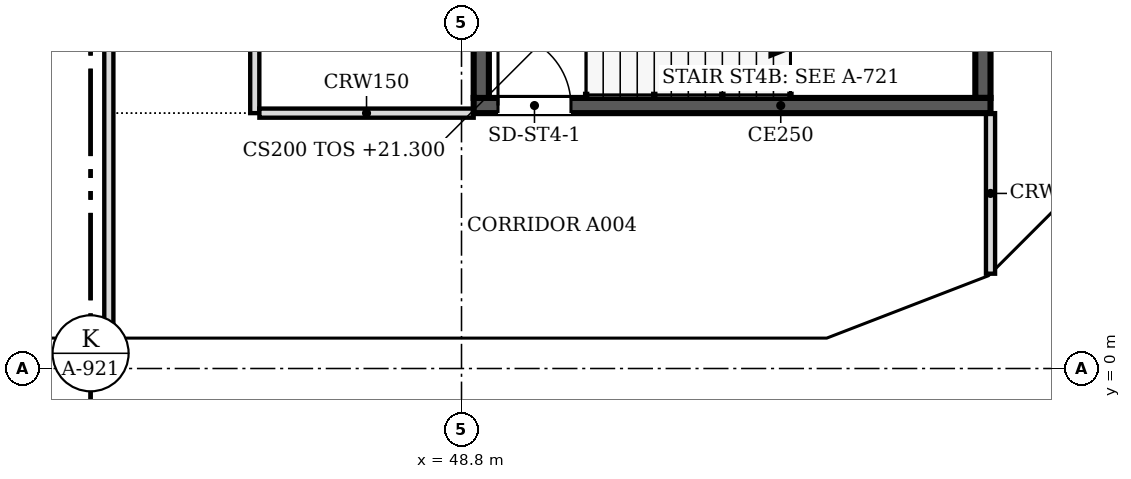
"""IFC4 building model, lengths in metres.
Left out: names, types, materials, properties, quantities, classifications, styles, units other than length and angle.
Written with IfcOpenShell. Run it as: python <this file> out.ifc"""

import sys

from ifc_helpers import new_model, si_unit, direction, frame, frame_2d, origin, place, context, subcontext, project, spatial, polyline, rectangle, outline, extrude, faceted_brep, source, transform, mapped, element, fill, save


model = new_model("IFC4")
c1 = context("Model", 3, precision=1e-05, world=origin(), true_north=direction((0.0, 1.0)))
c2 = subcontext(c1, "Body", "Model", "MODEL_VIEW")
j1 = project(units=[si_unit("LENGTHUNIT", "METRE"), si_unit("PLANEANGLEUNIT", "RADIAN")], contexts=[c1])
p1 = place(None, origin())
s1 = spatial("IfcSite", under=j1, at=p1, CompositionType="ELEMENT")
p2 = place(p1, origin())
s2 = spatial("IfcBuilding", under=s1, at=p2, CompositionType="ELEMENT")
p3 = place(p2, frame((0.0, 0.0, 21.3)))
s3 = spatial("IfcBuildingStorey", under=s2, at=p3, CompositionType="ELEMENT", Elevation=21.3)
m1 = source(origin(), c2, "Body", "Brep", [
    faceted_brep([(3.05, -0.25, 0.0), (6.1, -0.25, 4.5), (6.1, -0.25, 4.5), (3.05, -0.25, 9.0), (0.0, -0.25, 4.5), (0.0, 0.25, 4.5), (3.05, 0.25, 9.0), (6.1, 0.25, 4.5), (6.1, 0.25, 4.5), (3.05, 0.25, 0.0)], [[[0, 1, 2, 3, 4]], [[5, 6, 7, 8, 9]], [[9, 8, 1, 0]], [[7, 6, 3, 2]], [[6, 5, 4, 3]], [[5, 9, 0, 4]], [[1, 8, 7, 2]]]),
])
p4 = place(p3, frame((36.6, 0.25, -4.5), z_axis=(0.0, 0.0, 1.0), x_axis=(1.0, 0.0, 0.0)))
e1 = element("IfcWall", 1, at=p4, inside=s3, PredefinedType="SOLIDWALL", context=c2, shape_type="MappedRepresentation", body=[
    mapped(m1, transform((0.0, 0.0, 0.0), scale=1.0)),
])
m2 = source(origin(), c2, "Body", "SweptSolid", [
    extrude(outline(polyline([(3.05, 0.446), (5.798, 4.5), (3.05, 8.554), (0.302, 4.5), (3.05, 0.446)])), frame((0.0, 0.26, 0.0), z_axis=(0.0, -1.0, 0.0), x_axis=(1.0, 0.0, 0.0)), (0.0, 0.0, 1.0), 0.52),
])
p5 = place(p4, origin())
e2 = element("IfcOpeningElement", 2, at=p5, cuts=e1, PredefinedType="OPENING", context=c2, shape_type="MappedRepresentation", body=[
    mapped(m2, transform((0.0, 0.0, 0.0), scale=1.0)),
])
m3 = source(origin(), c2, "Body", "SweptSolid", [
    extrude(outline(polyline([(3.05, 0.0), (6.1, 4.5), (3.05, 9.0), (0.0, 4.5), (3.05, 0.0)])), frame((0.0, 0.25, 0.0), z_axis=(0.0, -1.0, 0.0), x_axis=(1.0, 0.0, 0.0)), (0.0, 0.0, 1.0), 0.5),
])
p6 = place(p3, frame((42.7, 0.25, -4.5), z_axis=(0.0, 0.0, 1.0), x_axis=(1.0, 0.0, 0.0)))
e3 = element("IfcWall", 3, at=p6, inside=s3, PredefinedType="SOLIDWALL", context=c2, shape_type="MappedRepresentation", body=[
    mapped(m3, transform((0.0, 0.0, 0.0), scale=1.0)),
])
p7 = place(p6, origin())
e4 = element("IfcOpeningElement", 4, at=p7, cuts=e3, PredefinedType="OPENING", context=c2, shape_type="MappedRepresentation", body=[
    mapped(m2, transform((0.0, 0.0, 0.0), scale=1.0)),
])
m4 = source(origin(), c2, "Body", "Brep", [
    faceted_brep([(3.05, -0.25, 0.0), (6.053, -0.25, 4.5), (3.05, -0.25, 9.0), (0.0, -0.25, 4.5), (0.0, 0.25, 4.5), (3.05, 0.25, 9.0), (6.007, 0.25, 4.57), (6.007, 0.25, 4.43), (3.05, 0.25, 0.0), (6.053, 0.0, 4.5)], [[[0, 1, 2, 3]], [[4, 5, 6, 7, 8]], [[8, 7, 9, 1, 0]], [[6, 5, 2, 1, 9]], [[5, 4, 3, 2]], [[4, 8, 0, 3]], [[9, 7, 6]]]),
])
p8 = place(p3, frame((48.8, 0.25, -4.5), z_axis=(0.0, 0.0, 1.0), x_axis=(1.0, 0.0, 0.0)))
e5 = element("IfcWall", 5, at=p8, inside=s3, PredefinedType="SOLIDWALL", context=c2, shape_type="MappedRepresentation", body=[
    mapped(m4, transform((0.0, 0.0, 0.0), scale=1.0)),
])
m5 = source(origin(), c2, "Body", "SweptSolid", [
    extrude(outline(polyline([(3.048, 0.448), (5.753, 4.5), (3.048, 8.552), (0.302, 4.5), (3.048, 0.448)])), frame((0.0, 0.26, 0.0), z_axis=(0.0, -1.0, 0.0), x_axis=(1.0, 0.0, 0.0)), (0.0, 0.0, 1.0), 0.52),
])
p9 = place(p8, origin())
e6 = element("IfcOpeningElement", 6, at=p9, cuts=e5, PredefinedType="OPENING", context=c2, shape_type="MappedRepresentation", body=[
    mapped(m5, transform((0.0, 0.0, 0.0), scale=1.0)),
])
m6 = source(origin(), c2, "Body", "Brep", [
    faceted_brep([(2.95, -0.25, 0.0), (3.003, -0.25, 0.081), (3.003, -0.25, 8.919), (2.95, -0.25, 9.0), (0.0, -0.25, 4.5), (0.047, 0.25, 4.571), (2.898, 0.25, 8.919), (2.898, 0.25, 0.081), (0.047, 0.25, 4.429), (2.95, 0.0, 0.0), (2.95, 0.0, 9.0), (0.0, 0.0, 4.5)], [[[0, 1, 2, 3, 4]], [[5, 6, 7, 8]], [[1, 0, 9]], [[10, 3, 2]], [[6, 5, 11, 4, 3, 10]], [[8, 7, 9, 0, 4, 11]], [[8, 11, 5]], [[1, 9, 7, 6, 10, 2]]]),
])
p10 = place(p3, frame((54.854, 0.25, -4.5), z_axis=(0.0, 0.0, 1.0), x_axis=(0.932970071518, 0.359953949349, 0.0)))
e7 = element("IfcWall", 7, at=p10, inside=s3, PredefinedType="SOLIDWALL", context=c2, shape_type="MappedRepresentation", body=[
    mapped(m6, transform((0.0, 0.0, 0.0), scale=1.0)),
])
m7 = source(origin(), c2, "Body", "SweptSolid", [
    extrude(outline(polyline([(2.75, 8.239), (0.299, 4.5), (2.75, 0.761), (2.75, 8.239)])), frame((0.0, 0.26, 0.0), z_axis=(0.0, -1.0, 0.0), x_axis=(1.0, 0.0, 0.0)), (0.0, 0.0, 1.0), 0.52),
])
p11 = place(p10, origin())
e8 = element("IfcOpeningElement", 8, at=p11, cuts=e7, PredefinedType="OPENING", context=c2, shape_type="MappedRepresentation", body=[
    mapped(m7, transform((0.0, 0.0, 0.0), scale=1.0)),
])
m8 = source(origin(), c2, "Body", "Brep", [
    faceted_brep([(0.053, -0.25, 0.0), (2.997, -0.25, 4.5), (0.053, -0.25, 9.0), (0.0, -0.25, 8.919), (0.0, -0.25, 0.081), (0.106, 0.25, 8.919), (2.944, 0.25, 4.581), (2.944, 0.25, 4.419), (0.106, 0.25, 0.081), (2.997, 0.0, 4.5), (0.053, 0.0, 0.0), (0.053, 0.0, 9.0)], [[[0, 1, 2, 3, 4]], [[5, 6, 7, 8]], [[8, 7, 9, 1, 0, 10]], [[6, 5, 11, 2, 1, 9]], [[3, 2, 11]], [[10, 0, 4]], [[8, 10, 4, 3, 11, 5]], [[9, 7, 6]]]),
])
p12 = place(p3, frame((57.569, 1.274, -4.5), z_axis=(0.0, 0.0, 1.0), x_axis=(0.707066050402, 0.707147509625, 0.0)))
e9 = element("IfcWall", 9, at=p12, inside=s3, PredefinedType="SOLIDWALL", context=c2, shape_type="MappedRepresentation", body=[
    mapped(m8, transform((0.0, 0.0, 0.0), scale=1.0)),
])
m9 = source(origin(), c2, "Body", "SweptSolid", [
    extrude(outline(polyline([(0.253, 0.762), (2.698, 4.5), (0.253, 8.238), (0.253, 0.762)])), frame((0.0, 0.26, 0.0), z_axis=(0.0, -1.0, 0.0), x_axis=(1.0, 0.0, 0.0)), (0.0, 0.0, 1.0), 0.52),
])
p13 = place(p12, origin())
e10 = element("IfcOpeningElement", 10, at=p13, cuts=e9, PredefinedType="OPENING", context=c2, shape_type="MappedRepresentation", body=[
    mapped(m9, transform((0.0, 0.0, 0.0), scale=1.0)),
])
m10 = source(origin(), c2, "Body", "SweptSolid", [
    extrude(outline(polyline([(3.05, 0.0), (6.1, 4.5), (0.0, 4.5), (3.05, 0.0)])), frame((0.0, 0.25, 0.0), z_axis=(0.0, -1.0, 0.0), x_axis=(1.0, 0.0, 0.0)), (0.0, 0.0, 1.0), 0.5),
])
p14 = place(p3, frame((39.65, 0.25, 0.0), z_axis=(0.0, 0.0, 1.0), x_axis=(1.0, 0.0, 0.0)))
e11 = element("IfcWall", 11, at=p14, inside=s3, PredefinedType="SOLIDWALL", context=c2, shape_type="MappedRepresentation", body=[
    mapped(m10, transform((0.0, 0.0, 0.0), scale=1.0)),
])
m11 = source(origin(), c2, "Body", "SweptSolid", [
    extrude(outline(polyline([(3.05, 0.446), (5.629, 4.25), (0.471, 4.25), (3.05, 0.446)])), frame((0.0, 0.26, 0.0), z_axis=(0.0, -1.0, 0.0), x_axis=(1.0, 0.0, 0.0)), (0.0, 0.0, 1.0), 0.52),
])
p15 = place(p14, origin())
e12 = element("IfcOpeningElement", 12, at=p15, cuts=e11, PredefinedType="OPENING", context=c2, shape_type="MappedRepresentation", body=[
    mapped(m11, transform((0.0, 0.0, 0.0), scale=1.0)),
])
p16 = place(p3, frame((45.75, 0.25, 0.0), z_axis=(0.0, 0.0, 1.0), x_axis=(1.0, 0.0, 0.0)))
e13 = element("IfcWall", 13, at=p16, inside=s3, PredefinedType="SOLIDWALL", context=c2, shape_type="MappedRepresentation", body=[
    mapped(m10, transform((0.0, 0.0, 0.0), scale=1.0)),
])
p17 = place(p16, origin())
e14 = element("IfcOpeningElement", 14, at=p17, cuts=e13, PredefinedType="OPENING", context=c2, shape_type="MappedRepresentation", body=[
    mapped(m11, transform((0.0, 0.0, 0.0), scale=1.0)),
])
m12 = source(origin(), c2, "Body", "Brep", [
    faceted_brep([(3.003, -0.25, 0.0), (3.05, -0.25, 0.071), (3.05, -0.25, 4.5), (0.0, -0.25, 4.5), (0.0, 0.25, 4.5), (2.957, 0.25, 4.5), (2.957, 0.25, 0.07), (3.003, 0.0, 0.0)], [[[0, 1, 2, 3]], [[4, 5, 6]], [[1, 0, 7]], [[5, 4, 3, 2]], [[4, 6, 7, 0, 3]], [[1, 7, 6, 5, 2]]]),
])
p18 = place(p3, frame((51.85, 0.25, 0.0), z_axis=(0.0, 0.0, 1.0), x_axis=(1.0, 0.0, 0.0)))
e15 = element("IfcWall", 15, at=p18, inside=s3, PredefinedType="SOLIDWALL", context=c2, shape_type="MappedRepresentation", body=[
    mapped(m12, transform((0.0, 0.0, 0.0), scale=1.0)),
])
m13 = source(origin(), c2, "Body", "SweptSolid", [
    extrude(outline(polyline([(2.803, 4.25), (0.468, 4.25), (2.803, 0.75), (2.803, 4.25)])), frame((0.0, 0.26, 0.0), z_axis=(0.0, -1.0, 0.0), x_axis=(1.0, 0.0, 0.0)), (0.0, 0.0, 1.0), 0.52),
])
p19 = place(p18, origin())
e16 = element("IfcOpeningElement", 16, at=p19, cuts=e15, PredefinedType="OPENING", context=c2, shape_type="MappedRepresentation", body=[
    mapped(m13, transform((0.0, 0.0, 0.0), scale=1.0)),
])
m14 = source(origin(), c2, "Body", "Brep", [
    faceted_brep([(0.047, -0.25, 0.0), (2.997, -0.25, 4.5), (0.0, -0.25, 4.5), (0.0, -0.25, 0.07), (0.093, 0.25, 4.5), (2.944, 0.25, 4.5), (2.944, 0.25, 4.419), (0.093, 0.25, 0.071), (2.997, 0.0, 4.5), (0.047, 0.0, 0.0)], [[[0, 1, 2, 3]], [[4, 5, 6, 7]], [[7, 6, 8, 1, 0, 9]], [[5, 4, 2, 1, 8]], [[9, 0, 3]], [[7, 9, 3, 2, 4]], [[6, 5, 8]]]),
])
p20 = place(p3, frame((54.81, 0.233, 0.0), z_axis=(0.0, 0.0, 1.0), x_axis=(0.932990326376, 0.359901446078, 0.0)))
e17 = element("IfcWall", 17, at=p20, inside=s3, PredefinedType="SOLIDWALL", context=c2, shape_type="MappedRepresentation", body=[
    mapped(m14, transform((0.0, 0.0, 0.0), scale=1.0)),
])
m15 = source(origin(), c2, "Body", "SweptSolid", [
    extrude(outline(polyline([(0.247, 0.761), (2.534, 4.25), (0.247, 4.25), (0.247, 0.761)])), frame((0.0, 0.26, 0.0), z_axis=(0.0, -1.0, 0.0), x_axis=(1.0, 0.0, 0.0)), (0.0, 0.0, 1.0), 0.52),
])
p21 = place(p20, origin())
e18 = element("IfcOpeningElement", 18, at=p21, cuts=e17, PredefinedType="OPENING", context=c2, shape_type="MappedRepresentation", body=[
    mapped(m15, transform((0.0, 0.0, 0.0), scale=1.0)),
])
m16 = source(origin(), c2, "Body", "Brep", [
    faceted_brep([(2.944, -0.25, 0.0), (2.997, -0.25, 0.081), (2.997, -0.25, 4.5), (0.0, -0.25, 4.5), (0.053, 0.25, 4.5), (2.891, 0.25, 4.5), (2.891, 0.25, 0.081), (0.053, 0.25, 4.419), (2.944, 0.0, 0.0), (0.0, 0.0, 4.5)], [[[0, 1, 2, 3]], [[4, 5, 6, 7]], [[1, 0, 8]], [[5, 4, 9, 3, 2]], [[7, 6, 8, 0, 3, 9]], [[7, 9, 4]], [[1, 8, 6, 5, 2]]]),
])
p22 = place(p3, frame((57.606, 1.312, 0.0), z_axis=(0.0, 0.0, 1.0), x_axis=(0.707147509625, 0.707066050402, 0.0)))
e19 = element("IfcWall", 19, at=p22, inside=s3, PredefinedType="SOLIDWALL", context=c2, shape_type="MappedRepresentation", body=[
    mapped(m16, transform((0.0, 0.0, 0.0), scale=1.0)),
])
m17 = source(origin(), c2, "Body", "SweptSolid", [
    extrude(outline(polyline([(2.744, 4.25), (0.462, 4.25), (2.744, 0.762), (2.744, 4.25)])), frame((0.0, 0.26, 0.0), z_axis=(0.0, -1.0, 0.0), x_axis=(1.0, 0.0, 0.0)), (0.0, 0.0, 1.0), 0.52),
])
p23 = place(p22, origin())
e20 = element("IfcOpeningElement", 20, at=p23, cuts=e19, PredefinedType="OPENING", context=c2, shape_type="MappedRepresentation", body=[
    mapped(m17, transform((0.0, 0.0, 0.0), scale=1.0)),
])
p24 = place(p3, frame((57.5, 4.325, 0.0), z_axis=(0.0, 0.0, 1.0), x_axis=(-1.0, 0.0, 0.0)))
e21 = element("IfcWall", 21, at=p24, inside=s3, PredefinedType="SOLIDWALL", context=c2, shape_type="SweptSolid", body=[
    extrude(rectangle(XDim=8.5, YDim=0.25, at=frame_2d((4.25, 0.0))), origin(), (0.0, 0.0, 1.0), 4.5),
])
m18 = source(origin(), c2, "Body", "SweptSolid", [
    extrude(rectangle(XDim=1.2, YDim=2.1, at=frame_2d((0.6, 1.05))), frame((0.0, 0.135, 0.0), z_axis=(0.0, -1.0, 0.0), x_axis=(1.0, 0.0, 0.0)), (0.0, 0.0, 1.0), 0.27),
])
p25 = place(p24, frame((6.9, 0.0, 0.0)))
e22 = element("IfcOpeningElement", 22, at=p25, cuts=e21, PredefinedType="OPENING", context=c2, shape_type="MappedRepresentation", body=[
    mapped(m18, transform((0.0, 0.0, 0.0), scale=1.0)),
])
for number, where, z_axis, x_axis in (
    (23, (49.125, 4.45, 0.0), (0.0, 0.0, 1.0), (0.0, 1.0, 0.0)),
    (24, (57.375, 7.85, 0.0), (0.0, 0.0, 1.0), (0.0, -1.0, 0.0)),
):
    element("IfcWall", number, at=place(p3, frame(where, z_axis=z_axis, x_axis=x_axis)), inside=s3, PredefinedType="SOLIDWALL", context=c2, shape_type="SweptSolid", body=[
        extrude(rectangle(XDim=3.4, YDim=0.25, at=frame_2d((1.7, 0.0))), origin(), (0.0, 0.0, 1.0), 4.5),
    ])
p26 = place(p3, frame((43.0, 0.5, 0.0), z_axis=(0.0, 0.0, 1.0), x_axis=(0.0, 1.0, 0.0)))
e25 = element("IfcWall", 25, at=p26, inside=s3, PredefinedType="PARTITIONING", context=c2, shape_type="SweptSolid", body=[
    extrude(rectangle(XDim=21.424, YDim=0.15, at=frame_2d((10.712, 0.0))), origin(), (0.0, 0.0, 1.0), 3.767),
])
m19 = source(origin(), c2, "Body", "SweptSolid", [
    extrude(rectangle(XDim=0.9, YDim=2.1, at=frame_2d((0.45, 1.05))), frame((0.0, 0.085, 0.0), z_axis=(0.0, -1.0, 0.0), x_axis=(1.0, 0.0, 0.0)), (0.0, 0.0, 1.0), 0.17),
])
p27 = place(p26, frame((16.601, 0.0, 0.0)))
e26 = element("IfcOpeningElement", 26, at=p27, cuts=e25, PredefinedType="OPENING", context=c2, shape_type="MappedRepresentation", body=[
    mapped(m19, transform((0.0, 0.0, 0.0), scale=1.0)),
])
m20 = source(origin(), c2, "Body", "SweptSolid", [
    extrude(rectangle(XDim=1.0, YDim=2.1, at=frame_2d((0.5, 1.05))), frame((0.0, 0.085, 0.0), z_axis=(0.0, -1.0, 0.0), x_axis=(1.0, 0.0, 0.0)), (0.0, 0.0, 1.0), 0.17),
])
p28 = place(p26, frame((7.7, 0.0, 0.0)))
e27 = element("IfcOpeningElement", 27, at=p28, cuts=e25, PredefinedType="OPENING", context=c2, shape_type="MappedRepresentation", body=[
    mapped(m20, transform((0.0, 0.0, 0.0), scale=1.0)),
])
p29 = place(p3, frame((57.5, 1.559, 0.0), z_axis=(0.0, 0.0, 1.0), x_axis=(0.0, 1.0, 0.0)))
e28 = element("IfcWall", 28, at=p29, inside=s3, PredefinedType="PARTITIONING", context=c2, shape_type="SweptSolid", body=[
    extrude(rectangle(XDim=2.641, YDim=0.15, at=frame_2d((1.32, 0.0))), origin(), (0.0, 0.0, 1.0), 3.767),
])
p30 = place(p3, frame((45.4, 21.924, 0.0), z_axis=(0.0, 0.0, 1.0), x_axis=(0.0, -1.0, 0.0)))
e29 = element("IfcWall", 29, at=p30, inside=s3, PredefinedType="PARTITIONING", context=c2, shape_type="SweptSolid", body=[
    extrude(rectangle(XDim=17.724, YDim=0.15, at=frame_2d((8.862, 0.0))), origin(), (0.0, 0.0, 1.0), 3.767),
])
p31 = place(p30, frame((3.423, 0.0, 0.0)))
e30 = element("IfcOpeningElement", 30, at=p31, cuts=e29, PredefinedType="OPENING", context=c2, shape_type="MappedRepresentation", body=[
    mapped(m20, transform((0.0, 0.0, 0.0), scale=1.0)),
])
p32 = place(p30, frame((12.324, 0.0, 0.0)))
e31 = element("IfcOpeningElement", 31, at=p32, cuts=e29, PredefinedType="OPENING", context=c2, shape_type="MappedRepresentation", body=[
    mapped(m20, transform((0.0, 0.0, 0.0), scale=1.0)),
])
p33 = place(p3, frame((45.476, 4.2, 0.0), z_axis=(0.0, 0.0, 1.0), x_axis=(1.0, 0.0, 0.0)))
e32 = element("IfcWall", 32, at=p33, inside=s3, PredefinedType="PARTITIONING", context=c2, shape_type="SweptSolid", body=[
    extrude(rectangle(XDim=3.524, YDim=0.15, at=frame_2d((1.762, 0.0))), origin(), (0.0, 0.0, 1.0), 3.767),
])
m21 = source(origin(), c2, "Body", "SweptSolid", [
    extrude(rectangle(XDim=1.2, YDim=2.1, at=frame_2d((0.6, 1.05))), frame((0.0, 0.025, 0.0), z_axis=(0.0, -1.0, 0.0), x_axis=(1.0, 0.0, 0.0)), (0.0, 0.0, 1.0), 0.05),
])
p34 = place(p25, origin())
e33 = element("IfcDoor", 33, at=p34, inside=s3, OperationType="SINGLE_SWING_RIGHT", PredefinedType="DOOR", context=c2, shape_type="MappedRepresentation", body=[
    mapped(m21, transform((0.0, 0.0, 0.0), scale=1.0)),
])
fill(e22, e33)
save(model, sys.argv[1])
